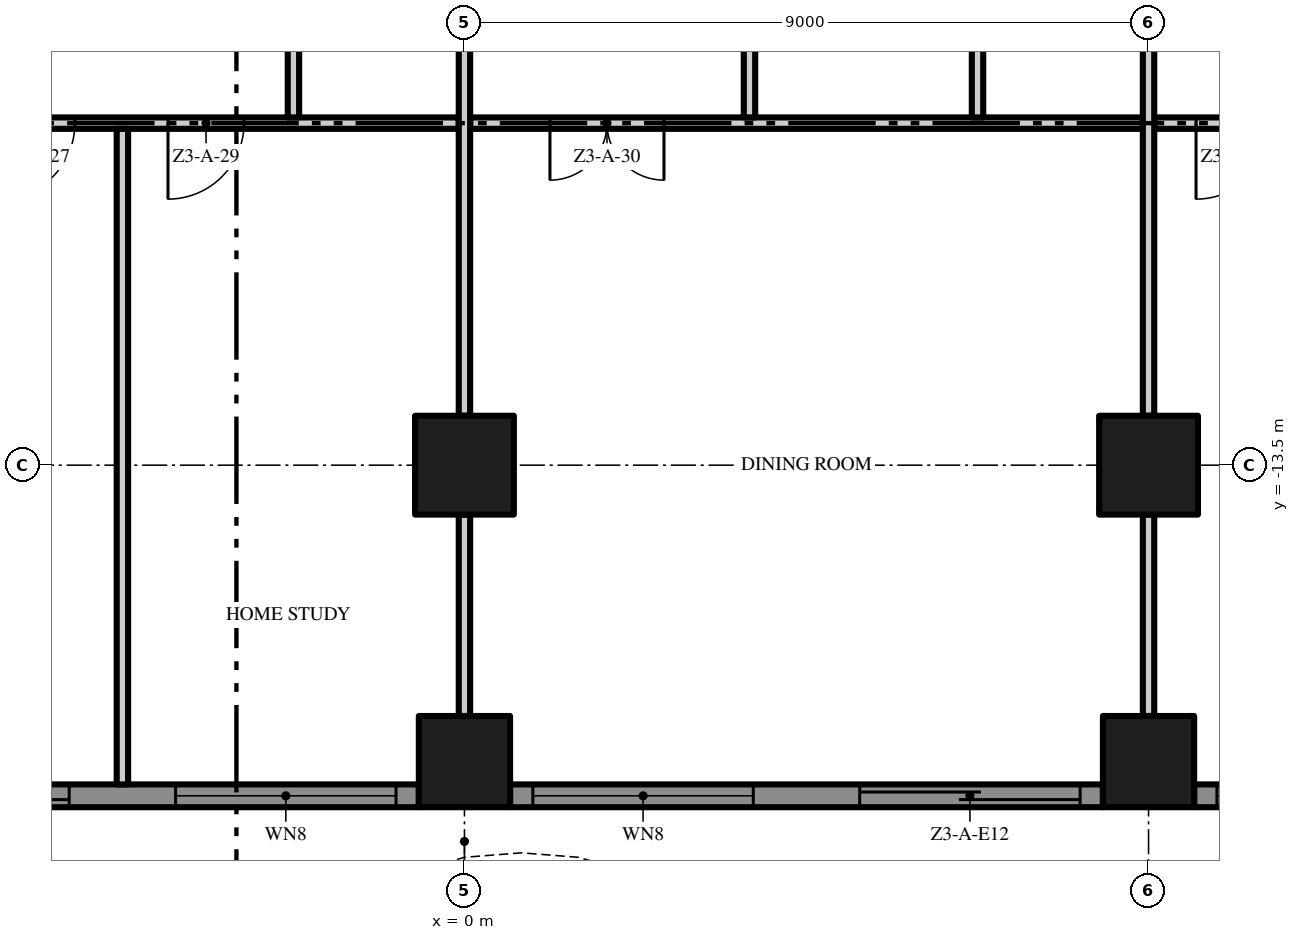
"""IFC4 building model, lengths in metres.
Left out: names, types, materials, properties, quantities, classifications, styles, units other than length and angle.
Written with IfcOpenShell. Run it as: python <this file> out.ifc"""

import sys

from ifc_helpers import new_model, si_unit, direction, frame, frame_2d, origin, origin_2d, place, context, subcontext, project, spatial, polyline, rectangle, outline, extrude, element, fill, save


model = new_model("IFC4")
c1 = context("Model", 3, precision=1e-05, world=origin(), true_north=direction((0.0, 1.0)))
c2 = subcontext(c1, "Body", "Model", "MODEL_VIEW")
j1 = project(units=[si_unit("LENGTHUNIT", "METRE"), si_unit("PLANEANGLEUNIT", "RADIAN")], contexts=[c1])
p1 = place(None, origin())
s1 = spatial("IfcSite", under=j1, at=p1, CompositionType="ELEMENT")
p2 = place(p1, origin())
s2 = spatial("IfcBuilding", under=s1, at=p2, CompositionType="ELEMENT")
p3 = place(p2, frame((0.0, 0.0, 128.8)))
s3 = spatial("IfcBuildingStorey", under=s2, at=p3, CompositionType="ELEMENT", Elevation=128.8)
p4 = place(p3, frame((0.0, -13.5, 0.0), z_axis=(0.0, 0.0, 1.0), x_axis=(1.0, 0.0, 0.0)))
e1 = element("IfcColumn", 1, at=p4, inside=s3, PredefinedType="COLUMN", context=c2, shape_type="SweptSolid", body=[
    extrude(rectangle(XDim=1.3, YDim=1.3, at=origin_2d()), origin(), (0.0, 0.0, 1.0), 3.5),
])
p5 = place(p3, frame((0.0, -17.4, 0.0), z_axis=(0.0, 0.0, 1.0), x_axis=(1.0, 0.0, 0.0)))
e2 = element("IfcColumn", 2, at=p5, inside=s3, PredefinedType="COLUMN", context=c2, shape_type="SweptSolid", body=[
    extrude(rectangle(XDim=1.2, YDim=1.2, at=origin_2d()), origin(), (0.0, 0.0, 1.0), 3.5),
])
p6 = place(p3, frame((9.0, -13.5, 0.0), z_axis=(0.0, 0.0, 1.0), x_axis=(1.0, 0.0, 0.0)))
e3 = element("IfcColumn", 3, at=p6, inside=s3, PredefinedType="COLUMN", context=c2, shape_type="SweptSolid", body=[
    extrude(rectangle(XDim=1.3, YDim=1.3, at=origin_2d()), origin(), (0.0, 0.0, 1.0), 3.5),
])
p7 = place(p3, frame((9.0, -17.4, 0.0), z_axis=(0.0, 0.0, 1.0), x_axis=(1.0, 0.0, 0.0)))
e4 = element("IfcColumn", 4, at=p7, inside=s3, PredefinedType="COLUMN", context=c2, shape_type="SweptSolid", body=[
    extrude(rectangle(XDim=1.2, YDim=1.2, at=origin_2d()), origin(), (0.0, 0.0, 1.0), 3.5),
])
p8 = place(p3, frame((-0.6, -17.85, 0.0), z_axis=(0.0, 0.0, 1.0), x_axis=(-1.0, 0.0, 0.0)))
e5 = element("IfcWall", 5, at=p8, inside=s3, PredefinedType="SOLIDWALL", context=c2, shape_type="SweptSolid", body=[
    extrude(rectangle(XDim=7.8, YDim=0.3, at=frame_2d((3.9, 0.0))), origin(), (0.0, 0.0, 1.0), 3.5),
])
p9 = place(p8, frame((4.6, 0.0, 0.0)))
e6 = element("IfcOpeningElement", 6, at=p9, cuts=e5, PredefinedType="OPENING", context=c2, shape_type="SweptSolid", body=[
    extrude(rectangle(XDim=2.9, YDim=2.4, at=frame_2d((1.45, 1.2))), frame((0.0, 0.16, 0.0), z_axis=(0.0, -1.0, 0.0), x_axis=(1.0, 0.0, 0.0)), (0.0, 0.0, 1.0), 0.32),
])
p10 = place(p8, frame((0.3, 0.0, 0.45)))
e7 = element("IfcOpeningElement", 7, at=p10, cuts=e5, PredefinedType="OPENING", context=c2, shape_type="SweptSolid", body=[
    extrude(rectangle(XDim=2.9, YDim=2.65, at=frame_2d((1.45, 1.325))), frame((0.0, 0.16, 0.0), z_axis=(0.0, -1.0, 0.0), x_axis=(1.0, 0.0, 0.0)), (0.0, 0.0, 1.0), 0.32),
])
p11 = place(p3, frame((8.4, -17.85, 0.0), z_axis=(0.0, 0.0, 1.0), x_axis=(-1.0, 0.0, 0.0)))
e8 = element("IfcWall", 8, at=p11, inside=s3, PredefinedType="SOLIDWALL", context=c2, shape_type="SweptSolid", body=[
    extrude(rectangle(XDim=7.8, YDim=0.3, at=frame_2d((3.9, 0.0))), origin(), (0.0, 0.0, 1.0), 3.5),
])
p12 = place(p11, frame((4.6, 0.0, 0.45)))
e9 = element("IfcOpeningElement", 9, at=p12, cuts=e8, PredefinedType="OPENING", context=c2, shape_type="SweptSolid", body=[
    extrude(rectangle(XDim=2.9, YDim=2.65, at=frame_2d((1.45, 1.325))), frame((0.0, 0.16, 0.0), z_axis=(0.0, -1.0, 0.0), x_axis=(1.0, 0.0, 0.0)), (0.0, 0.0, 1.0), 0.32),
])
p13 = place(p11, frame((0.3, 0.0, 0.0)))
e10 = element("IfcOpeningElement", 10, at=p13, cuts=e8, PredefinedType="OPENING", context=c2, shape_type="SweptSolid", body=[
    extrude(rectangle(XDim=2.9, YDim=2.4, at=frame_2d((1.45, 1.2))), frame((0.0, 0.16, 0.0), z_axis=(0.0, -1.0, 0.0), x_axis=(1.0, 0.0, 0.0)), (0.0, 0.0, 1.0), 0.32),
])
p14 = place(p3, frame((16.8, -17.85, 0.0), z_axis=(0.0, 0.0, 1.0), x_axis=(-1.0, 0.0, 0.0)))
e11 = element("IfcWall", 11, at=p14, inside=s3, PredefinedType="SOLIDWALL", context=c2, shape_type="SweptSolid", body=[
    extrude(rectangle(XDim=7.2, YDim=0.3, at=frame_2d((3.6, 0.0))), origin(), (0.0, 0.0, 1.0), 3.5),
])
p15 = place(p14, frame((4.0, 0.0, 0.45)))
e12 = element("IfcOpeningElement", 12, at=p15, cuts=e11, PredefinedType="OPENING", context=c2, shape_type="SweptSolid", body=[
    extrude(rectangle(XDim=2.9, YDim=2.65, at=frame_2d((1.45, 1.325))), frame((0.0, 0.16, 0.0), z_axis=(0.0, -1.0, 0.0), x_axis=(1.0, 0.0, 0.0)), (0.0, 0.0, 1.0), 0.32),
])
p16 = place(p14, frame((0.3, 0.0, 0.45)))
e13 = element("IfcOpeningElement", 13, at=p16, cuts=e11, PredefinedType="OPENING", context=c2, shape_type="SweptSolid", body=[
    extrude(rectangle(XDim=2.3, YDim=2.65, at=frame_2d((1.15, 1.325))), frame((0.0, 0.16, 0.0), z_axis=(0.0, -1.0, 0.0), x_axis=(1.0, 0.0, 0.0)), (0.0, 0.0, 1.0), 0.32),
])
p17 = place(p3, origin())
e14 = element("IfcWall", 14, at=p17, inside=s3, PredefinedType="USERDEFINED", context=c2, shape_type="SweptSolid", body=[
    extrude(outline(polyline([(-18.0, -19.8), (-16.5, -19.095), (-15.0, -18.659), (-14.25, -18.6), (-13.5, -18.659), (-12.0, -19.095), (-10.5, -19.8), (-9.0, -20.505), (-7.5, -20.941), (-6.75, -21.0), (-6.0, -20.941), (-4.5, -20.505), (-3.0, -19.8), (-1.5, -19.095), (0.0, -18.659), (0.75, -18.6), (1.5, -18.659), (3.0, -19.095), (4.5, -19.8), (6.0, -20.505), (7.5, -20.941), (8.25, -21.0), (9.0, -20.941), (10.5, -20.505), (12.0, -19.8), (13.5, -19.095), (15.0, -18.659), (15.75, -18.6), (16.5, -18.659), (18.0, -19.095), (18.07, -18.855), (16.545, -18.411), (15.75, -18.349), (14.955, -18.411), (13.411, -18.86), (11.894, -19.574), (10.411, -20.271), (8.955, -20.694), (8.25, -20.749), (7.545, -20.694), (6.089, -20.271), (4.606, -19.574), (3.089, -18.86), (1.545, -18.411), (0.75, -18.349), (-0.045, -18.411), (-1.589, -18.86), (-3.106, -19.574), (-4.589, -20.271), (-6.045, -20.694), (-6.75, -20.749), (-7.455, -20.694), (-8.911, -20.271), (-10.394, -19.574), (-11.911, -18.86), (-13.455, -18.411), (-14.25, -18.349), (-15.045, -18.411), (-16.589, -18.86), (-18.106, -19.574), (-18.0, -19.8)])), origin(), (0.0, 0.0, 1.0), 0.9),
])
p18 = place(p3, frame((-0.075, -9.0, 0.0), z_axis=(0.0, 0.0, 1.0), x_axis=(-1.0, 0.0, 0.0)))
e15 = element("IfcWall", 15, at=p18, inside=s3, PredefinedType="PARTITIONING", context=c2, shape_type="SweptSolid", body=[
    extrude(rectangle(XDim=6.6, YDim=0.15, at=frame_2d((3.3, 0.0))), origin(), (0.0, 0.0, 1.0), 3.5),
])
p19 = place(p18, frame((5.05, 0.0, 0.0)))
e16 = element("IfcOpeningElement", 16, at=p19, cuts=e15, PredefinedType="OPENING", context=c2, shape_type="SweptSolid", body=[
    extrude(rectangle(XDim=1.0, YDim=2.4, at=frame_2d((0.5, 1.2))), frame((0.0, 0.085, 0.0), z_axis=(0.0, -1.0, 0.0), x_axis=(1.0, 0.0, 0.0)), (0.0, 0.0, 1.0), 0.17),
])
p20 = place(p18, frame((2.825, 0.0, 0.0)))
e17 = element("IfcOpeningElement", 17, at=p20, cuts=e15, PredefinedType="OPENING", context=c2, shape_type="SweptSolid", body=[
    extrude(rectangle(XDim=1.0, YDim=2.4, at=frame_2d((0.5, 1.2))), frame((0.0, 0.085, 0.0), z_axis=(0.0, -1.0, 0.0), x_axis=(1.0, 0.0, 0.0)), (0.0, 0.0, 1.0), 0.17),
])
p21 = place(p3, frame((8.925, -9.0, 0.0), z_axis=(0.0, 0.0, 1.0), x_axis=(-1.0, 0.0, 0.0)))
e18 = element("IfcWall", 18, at=p21, inside=s3, PredefinedType="PARTITIONING", context=c2, shape_type="SweptSolid", body=[
    extrude(rectangle(XDim=8.85, YDim=0.15, at=frame_2d((4.425, 0.0))), origin(), (0.0, 0.0, 1.0), 3.5),
])
p22 = place(p21, frame((6.3, 0.0, 0.0)))
e19 = element("IfcOpeningElement", 19, at=p22, cuts=e18, PredefinedType="OPENING", context=c2, shape_type="SweptSolid", body=[
    extrude(rectangle(XDim=1.5, YDim=2.4, at=frame_2d((0.75, 1.2))), frame((0.0, 0.085, 0.0), z_axis=(0.0, -1.0, 0.0), x_axis=(1.0, 0.0, 0.0)), (0.0, 0.0, 1.0), 0.17),
])
p23 = place(p3, frame((11.175, -9.0, 0.0), z_axis=(0.0, 0.0, 1.0), x_axis=(-1.0, 0.0, 0.0)))
e20 = element("IfcWall", 20, at=p23, inside=s3, PredefinedType="PARTITIONING", context=c2, shape_type="SweptSolid", body=[
    extrude(rectangle(XDim=2.1, YDim=0.15, at=frame_2d((1.05, 0.0))), origin(), (0.0, 0.0, 1.0), 3.5),
])
p24 = place(p23, frame((0.55, 0.0, 0.0)))
e21 = element("IfcOpeningElement", 21, at=p24, cuts=e20, PredefinedType="OPENING", context=c2, shape_type="SweptSolid", body=[
    extrude(rectangle(XDim=1.0, YDim=2.4, at=frame_2d((0.5, 1.2))), frame((0.0, 0.085, 0.0), z_axis=(0.0, -1.0, 0.0), x_axis=(1.0, 0.0, 0.0)), (0.0, 0.0, 1.0), 0.17),
])
p25 = place(p3, frame((-4.5, -17.7, 0.0), z_axis=(0.0, 0.0, 1.0), x_axis=(0.0, 1.0, 0.0)))
e22 = element("IfcWall", 22, at=p25, inside=s3, PredefinedType="PARTITIONING", context=c2, shape_type="SweptSolid", body=[
    extrude(rectangle(XDim=8.625, YDim=0.15, at=frame_2d((4.312, 0.0))), origin(), (0.0, 0.0, 1.0), 3.5),
])
p26 = place(p3, frame((-2.25, -8.925, 0.0), z_axis=(0.0, 0.0, 1.0), x_axis=(0.0, 1.0, 0.0)))
e23 = element("IfcWall", 23, at=p26, inside=s3, PredefinedType="PARTITIONING", context=c2, shape_type="SweptSolid", body=[
    extrude(rectangle(XDim=4.5, YDim=0.15, at=frame_2d((2.25, 0.0))), origin(), (0.0, 0.0, 1.0), 3.5),
])
p27 = place(p3, frame((0.0, -16.8, 0.0), z_axis=(0.0, 0.0, 1.0), x_axis=(0.0, 1.0, 0.0)))
e24 = element("IfcWall", 24, at=p27, inside=s3, PredefinedType="PARTITIONING", context=c2, shape_type="SweptSolid", body=[
    extrude(rectangle(XDim=2.65, YDim=0.15, at=frame_2d((1.325, 0.0))), origin(), (0.0, 0.0, 1.0), 3.5),
])
p28 = place(p3, frame((0.0, -12.85, 0.0), z_axis=(0.0, 0.0, 1.0), x_axis=(0.0, 1.0, 0.0)))
e25 = element("IfcWall", 25, at=p28, inside=s3, PredefinedType="PARTITIONING", context=c2, shape_type="SweptSolid", body=[
    extrude(rectangle(XDim=7.7, YDim=0.15, at=frame_2d((3.85, 0.0))), origin(), (0.0, 0.0, 1.0), 3.5),
])
p29 = place(p3, frame((3.75, -8.925, 0.0), z_axis=(0.0, 0.0, 1.0), x_axis=(0.0, 1.0, 0.0)))
e26 = element("IfcWall", 26, at=p29, inside=s3, PredefinedType="PARTITIONING", context=c2, shape_type="SweptSolid", body=[
    extrude(rectangle(XDim=4.5, YDim=0.15, at=frame_2d((2.25, 0.0))), origin(), (0.0, 0.0, 1.0), 3.5),
])
p30 = place(p3, frame((6.75, -8.925, 0.0), z_axis=(0.0, 0.0, 1.0), x_axis=(0.0, 1.0, 0.0)))
e27 = element("IfcWall", 27, at=p30, inside=s3, PredefinedType="PARTITIONING", context=c2, shape_type="SweptSolid", body=[
    extrude(rectangle(XDim=4.35, YDim=0.15, at=frame_2d((2.175, 0.0))), origin(), (0.0, 0.0, 1.0), 3.5),
])
p31 = place(p3, frame((9.0, -16.8, 0.0), z_axis=(0.0, 0.0, 1.0), x_axis=(0.0, 1.0, 0.0)))
e28 = element("IfcWall", 28, at=p31, inside=s3, PredefinedType="PARTITIONING", context=c2, shape_type="SweptSolid", body=[
    extrude(rectangle(XDim=2.65, YDim=0.15, at=frame_2d((1.325, 0.0))), origin(), (0.0, 0.0, 1.0), 3.5),
])
p32 = place(p3, frame((9.0, -12.85, 0.0), z_axis=(0.0, 0.0, 1.0), x_axis=(0.0, 1.0, 0.0)))
e29 = element("IfcWall", 29, at=p32, inside=s3, PredefinedType="PARTITIONING", context=c2, shape_type="SweptSolid", body=[
    extrude(rectangle(XDim=7.7, YDim=0.15, at=frame_2d((3.85, 0.0))), origin(), (0.0, 0.0, 1.0), 3.5),
])
p33 = place(p9, origin())
e30 = element("IfcDoor", 30, at=p33, inside=s3, OperationType="SINGLE_SWING_LEFT", PredefinedType="DOOR", context=c2, shape_type="SweptSolid", body=[
    extrude(rectangle(XDim=2.9, YDim=2.4, at=frame_2d((1.45, 1.2))), frame((0.0, 0.025, 0.0), z_axis=(0.0, -1.0, 0.0), x_axis=(1.0, 0.0, 0.0)), (0.0, 0.0, 1.0), 0.05),
])
fill(e6, e30)
p34 = place(p10, origin())
e31 = element("IfcWindow", 31, at=p34, inside=s3, PartitioningType="SINGLE_PANEL", PredefinedType="WINDOW", context=c2, shape_type="SweptSolid", body=[
    extrude(rectangle(XDim=2.9, YDim=2.65, at=frame_2d((1.45, 1.325))), frame((0.0, 0.03, 0.0), z_axis=(0.0, -1.0, 0.0), x_axis=(1.0, 0.0, 0.0)), (0.0, 0.0, 1.0), 0.06),
])
fill(e7, e31)
p35 = place(p12, origin())
e32 = element("IfcWindow", 32, at=p35, inside=s3, PartitioningType="SINGLE_PANEL", PredefinedType="WINDOW", context=c2, shape_type="SweptSolid", body=[
    extrude(rectangle(XDim=2.9, YDim=2.65, at=frame_2d((1.45, 1.325))), frame((0.0, 0.03, 0.0), z_axis=(0.0, -1.0, 0.0), x_axis=(1.0, 0.0, 0.0)), (0.0, 0.0, 1.0), 0.06),
])
fill(e9, e32)
p36 = place(p13, origin())
e33 = element("IfcDoor", 33, at=p36, inside=s3, OperationType="SINGLE_SWING_LEFT", PredefinedType="DOOR", context=c2, shape_type="SweptSolid", body=[
    extrude(rectangle(XDim=2.9, YDim=2.4, at=frame_2d((1.45, 1.2))), frame((0.0, 0.025, 0.0), z_axis=(0.0, -1.0, 0.0), x_axis=(1.0, 0.0, 0.0)), (0.0, 0.0, 1.0), 0.05),
])
fill(e10, e33)
p37 = place(p15, origin())
e34 = element("IfcWindow", 34, at=p37, inside=s3, PartitioningType="SINGLE_PANEL", PredefinedType="WINDOW", context=c2, shape_type="SweptSolid", body=[
    extrude(rectangle(XDim=2.9, YDim=2.65, at=frame_2d((1.45, 1.325))), frame((0.0, 0.03, 0.0), z_axis=(0.0, -1.0, 0.0), x_axis=(1.0, 0.0, 0.0)), (0.0, 0.0, 1.0), 0.06),
])
fill(e12, e34)
p38 = place(p19, origin())
e35 = element("IfcDoor", 35, at=p38, inside=s3, OperationType="SINGLE_SWING_RIGHT", PredefinedType="DOOR", context=c2, shape_type="SweptSolid", body=[
    extrude(rectangle(XDim=1.0, YDim=2.4, at=frame_2d((0.5, 1.2))), frame((0.0, 0.025, 0.0), z_axis=(0.0, -1.0, 0.0), x_axis=(1.0, 0.0, 0.0)), (0.0, 0.0, 1.0), 0.05),
])
fill(e16, e35)
p39 = place(p20, origin())
e36 = element("IfcDoor", 36, at=p39, inside=s3, OperationType="SINGLE_SWING_RIGHT", PredefinedType="DOOR", context=c2, shape_type="SweptSolid", body=[
    extrude(rectangle(XDim=1.0, YDim=2.4, at=frame_2d((0.5, 1.2))), frame((0.0, 0.025, 0.0), z_axis=(0.0, -1.0, 0.0), x_axis=(1.0, 0.0, 0.0)), (0.0, 0.0, 1.0), 0.05),
])
fill(e17, e36)
p40 = place(p22, origin())
e37 = element("IfcDoor", 37, at=p40, inside=s3, OperationType="DOUBLE_DOOR_SINGLE_SWING", PredefinedType="DOOR", context=c2, shape_type="SweptSolid", body=[
    extrude(rectangle(XDim=1.5, YDim=2.4, at=frame_2d((0.75, 1.2))), frame((0.0, 0.025, 0.0), z_axis=(0.0, -1.0, 0.0), x_axis=(1.0, 0.0, 0.0)), (0.0, 0.0, 1.0), 0.05),
])
fill(e19, e37)
p41 = place(p24, origin())
e38 = element("IfcDoor", 38, at=p41, inside=s3, OperationType="SINGLE_SWING_RIGHT", PredefinedType="DOOR", context=c2, shape_type="SweptSolid", body=[
    extrude(rectangle(XDim=1.0, YDim=2.4, at=frame_2d((0.5, 1.2))), frame((0.0, 0.025, 0.0), z_axis=(0.0, -1.0, 0.0), x_axis=(1.0, 0.0, 0.0)), (0.0, 0.0, 1.0), 0.05),
])
fill(e21, e38)
save(model, sys.argv[1])
